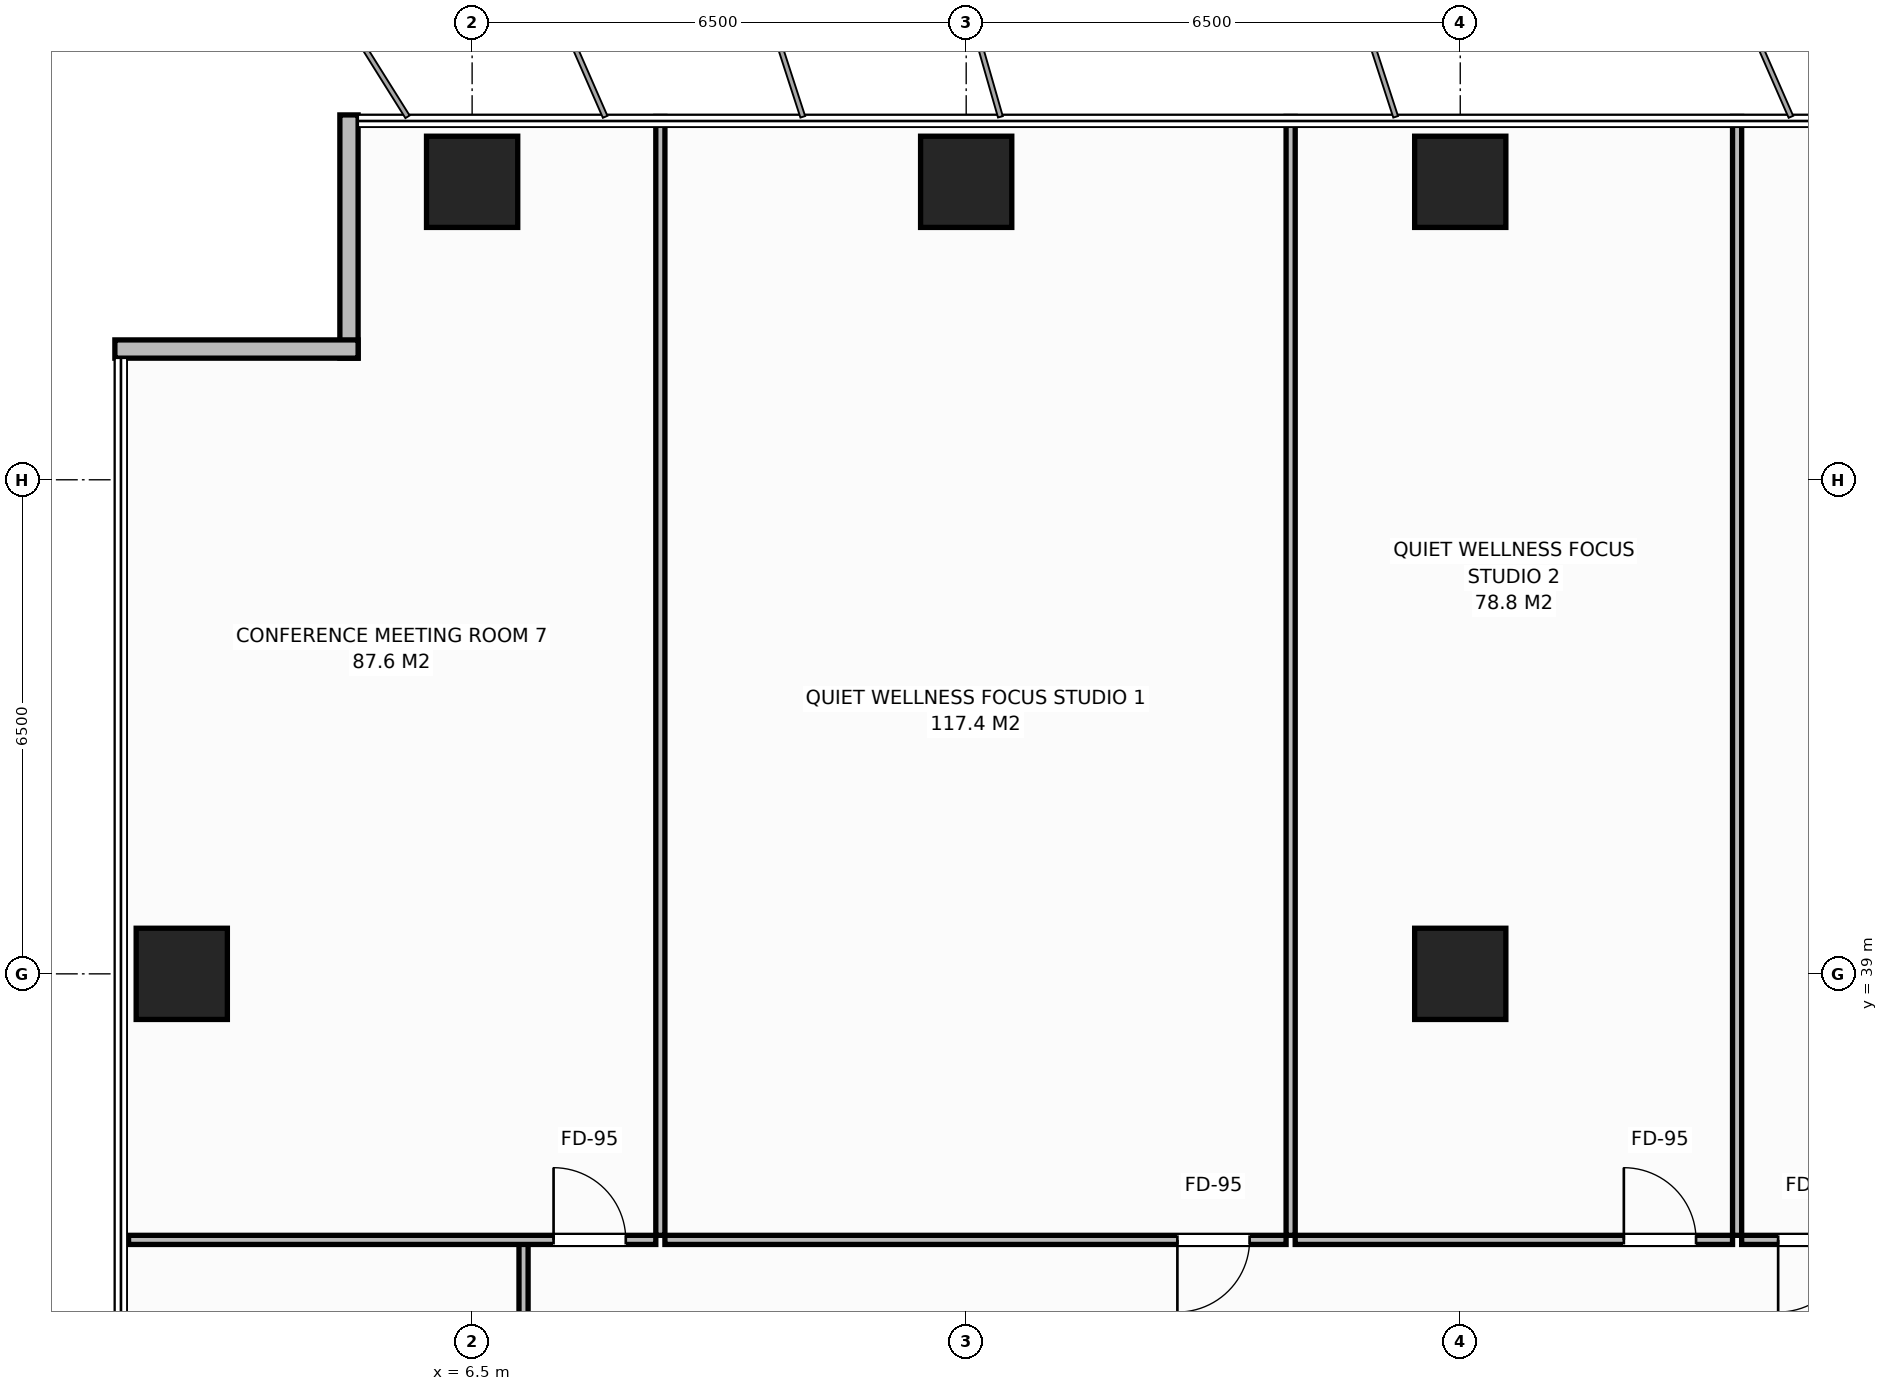
"""IFC4 building model, lengths in metres.
Left out: names, types, materials, properties, quantities, classifications, styles, units other than length and angle.
Written with IfcOpenShell. Run it as: python <this file> out.ifc"""

import sys

from ifc_helpers import new_model, si_unit, direction, frame, frame_2d, origin, origin_2d, place, context, subcontext, project, spatial, rectangle, extrude, element, fill, save


model = new_model("IFC4")
c1 = context("Model", 3, precision=1e-05, world=origin(), true_north=direction((0.0, 1.0)))
c2 = subcontext(c1, "Body", "Model", "MODEL_VIEW")
j1 = project(units=[si_unit("LENGTHUNIT", "METRE"), si_unit("PLANEANGLEUNIT", "RADIAN")], contexts=[c1])
p1 = place(None, origin())
s1 = spatial("IfcSite", under=j1, at=p1, CompositionType="ELEMENT")
p2 = place(p1, origin())
s2 = spatial("IfcBuilding", under=s1, at=p2, CompositionType="ELEMENT")
p3 = place(p2, frame((0.0, 0.0, 131.6)))
s3 = spatial("IfcBuildingStorey", under=s2, at=p3, CompositionType="ELEMENT", Elevation=131.6)
for number, where, z_axis, x_axis in (
    (1, (19.5, 39.0, 0.0), (0.0, 0.0, 1.0), (1.0, 0.0, 0.0)),
    (2, (6.5, 49.42, 0.0), (0.0, 0.0, 1.0), (1.0, 0.0, 0.0)),
    (3, (13.0, 49.42, 0.0), (0.0, 0.0, 1.0), (1.0, 0.0, 0.0)),
    (4, (19.5, 49.42, 0.0), (0.0, 0.0, 1.0), (1.0, 0.0, 0.0)),
    (5, (2.68, 39.0, 0.0), (0.0, 0.0, 1.0), (1.0, 0.0, 0.0)),
):
    element("IfcColumn", number, at=place(p3, frame(where, z_axis=z_axis, x_axis=x_axis)), inside=s3, PredefinedType="COLUMN", context=c2, shape_type="SweptSolid", body=[
        extrude(rectangle(XDim=1.2, YDim=1.2, at=origin_2d()), origin(), (0.0, 0.0, 1.0), 3.8),
    ])
for number, where, z_axis, x_axis in (
    (6, (4.88, 47.1, 0.0), (0.0, 0.0, 1.0), (0.0, 1.0, 0.0)),
    (7, (1.8, 47.22, 0.0), (0.0, 0.0, 1.0), (1.0, 0.0, 0.0)),
):
    element("IfcWall", number, at=place(p3, frame(where, z_axis=z_axis, x_axis=x_axis)), inside=s3, PredefinedType="STANDARD", context=c2, shape_type="SweptSolid", body=[
        extrude(rectangle(XDim=3.2, YDim=0.24, at=frame_2d((1.6, 0.0))), origin(), (0.0, 0.0, 1.0), 3.565),
    ])
p4 = place(p3, frame((7.177, 33.4, 0.0), z_axis=(0.0, 0.0, 1.0), x_axis=(0.0, 1.0, 0.0)))
e8 = element("IfcWall", 8, at=p4, inside=s3, PredefinedType="PARTITIONING", context=c2, shape_type="SweptSolid", body=[
    extrude(rectangle(XDim=2.1, YDim=0.12, at=frame_2d((1.05, 0.0))), origin(), (0.0, 0.0, 1.0), 3.565),
])
p5 = place(p3, frame((8.977, 35.56, 0.0), z_axis=(0.0, 0.0, 1.0), x_axis=(0.0, 1.0, 0.0)))
e9 = element("IfcWall", 9, at=p5, inside=s3, PredefinedType="PARTITIONING", context=c2, shape_type="SweptSolid", body=[
    extrude(rectangle(XDim=14.72, YDim=0.12, at=frame_2d((7.36, 0.0))), origin(), (0.0, 0.0, 1.0), 3.565),
])
p6 = place(p3, frame((1.98, 35.5, 0.0), z_axis=(0.0, 0.0, 1.0), x_axis=(1.0, 0.0, 0.0)))
e10 = element("IfcWall", 10, at=p6, inside=s3, PredefinedType="PARTITIONING", context=c2, shape_type="SweptSolid", body=[
    extrude(rectangle(XDim=6.937, YDim=0.12, at=frame_2d((3.468, 0.0))), origin(), (0.0, 0.0, 1.0), 3.565),
])
p7 = place(p6, frame((5.592, 0.0, 0.0)))
e11 = element("IfcOpeningElement", 11, at=p7, cuts=e10, PredefinedType="OPENING", context=c2, shape_type="SweptSolid", body=[
    extrude(rectangle(XDim=0.95, YDim=2.15, at=frame_2d((0.475, 1.075))), frame((0.0, 0.07, 0.0), z_axis=(0.0, -1.0, 0.0), x_axis=(1.0, 0.0, 0.0)), (0.0, 0.0, 1.0), 0.14),
])
p8 = place(p3, frame((17.269, 35.56, 0.0), z_axis=(0.0, 0.0, 1.0), x_axis=(0.0, 1.0, 0.0)))
e12 = element("IfcWall", 12, at=p8, inside=s3, PredefinedType="PARTITIONING", context=c2, shape_type="SweptSolid", body=[
    extrude(rectangle(XDim=14.72, YDim=0.12, at=frame_2d((7.36, 0.0))), origin(), (0.0, 0.0, 1.0), 3.565),
])
p9 = place(p3, frame((9.037, 35.5, 0.0), z_axis=(0.0, 0.0, 1.0), x_axis=(1.0, 0.0, 0.0)))
e13 = element("IfcWall", 13, at=p9, inside=s3, PredefinedType="PARTITIONING", context=c2, shape_type="SweptSolid", body=[
    extrude(rectangle(XDim=8.172, YDim=0.12, at=frame_2d((4.086, 0.0))), origin(), (0.0, 0.0, 1.0), 3.565),
])
p10 = place(p9, frame((6.742, 0.0, 0.0)))
e14 = element("IfcOpeningElement", 14, at=p10, cuts=e13, PredefinedType="OPENING", context=c2, shape_type="SweptSolid", body=[
    extrude(rectangle(XDim=0.95, YDim=2.15, at=frame_2d((0.475, 1.075))), frame((0.0, 0.07, 0.0), z_axis=(0.0, -1.0, 0.0), x_axis=(1.0, 0.0, 0.0)), (0.0, 0.0, 1.0), 0.14),
])
p11 = place(p3, frame((23.142, 35.56, 0.0), z_axis=(0.0, 0.0, 1.0), x_axis=(0.0, 1.0, 0.0)))
e15 = element("IfcWall", 15, at=p11, inside=s3, PredefinedType="PARTITIONING", context=c2, shape_type="SweptSolid", body=[
    extrude(rectangle(XDim=14.72, YDim=0.12, at=frame_2d((7.36, 0.0))), origin(), (0.0, 0.0, 1.0), 3.565),
])
p12 = place(p3, frame((17.329, 35.5, 0.0), z_axis=(0.0, 0.0, 1.0), x_axis=(1.0, 0.0, 0.0)))
e16 = element("IfcWall", 16, at=p12, inside=s3, PredefinedType="PARTITIONING", context=c2, shape_type="SweptSolid", body=[
    extrude(rectangle(XDim=5.754, YDim=0.12, at=frame_2d((2.877, 0.0))), origin(), (0.0, 0.0, 1.0), 3.565),
])
p13 = place(p12, frame((4.323, 0.0, 0.0)))
e17 = element("IfcOpeningElement", 17, at=p13, cuts=e16, PredefinedType="OPENING", context=c2, shape_type="SweptSolid", body=[
    extrude(rectangle(XDim=0.95, YDim=2.15, at=frame_2d((0.475, 1.075))), frame((0.0, 0.07, 0.0), z_axis=(0.0, -1.0, 0.0), x_axis=(1.0, 0.0, 0.0)), (0.0, 0.0, 1.0), 0.14),
])
p14 = place(p3, frame((23.202, 35.5, 0.0), z_axis=(0.0, 0.0, 1.0), x_axis=(1.0, 0.0, 0.0)))
e18 = element("IfcWall", 18, at=p14, inside=s3, PredefinedType="PARTITIONING", context=c2, shape_type="SweptSolid", body=[
    extrude(rectangle(XDim=8.172, YDim=0.12, at=frame_2d((4.086, 0.0))), origin(), (0.0, 0.0, 1.0), 3.565),
])
p15 = place(p14, frame((0.48, 0.0, 0.0)))
e19 = element("IfcOpeningElement", 19, at=p15, cuts=e18, PredefinedType="OPENING", context=c2, shape_type="SweptSolid", body=[
    extrude(rectangle(XDim=0.95, YDim=2.15, at=frame_2d((0.475, 1.075))), frame((0.0, 0.07, 0.0), z_axis=(0.0, -1.0, 0.0), x_axis=(1.0, 0.0, 0.0)), (0.0, 0.0, 1.0), 0.14),
])
p16 = place(p7, origin())
e20 = element("IfcDoor", 20, at=p16, inside=s3, OperationType="SINGLE_SWING_LEFT", PredefinedType="DOOR", context=c2, shape_type="SweptSolid", body=[
    extrude(rectangle(XDim=0.95, YDim=2.15, at=frame_2d((0.475, 1.075))), frame((0.0, 0.025, 0.0), z_axis=(0.0, -1.0, 0.0), x_axis=(1.0, 0.0, 0.0)), (0.0, 0.0, 1.0), 0.05),
])
fill(e11, e20)
p17 = place(p10, origin())
e21 = element("IfcDoor", 21, at=p17, inside=s3, OperationType="SINGLE_SWING_RIGHT", PredefinedType="DOOR", context=c2, shape_type="SweptSolid", body=[
    extrude(rectangle(XDim=0.95, YDim=2.15, at=frame_2d((0.475, 1.075))), frame((0.0, 0.025, 0.0), z_axis=(0.0, -1.0, 0.0), x_axis=(1.0, 0.0, 0.0)), (0.0, 0.0, 1.0), 0.05),
])
fill(e14, e21)
p18 = place(p13, origin())
e22 = element("IfcDoor", 22, at=p18, inside=s3, OperationType="SINGLE_SWING_LEFT", PredefinedType="DOOR", context=c2, shape_type="SweptSolid", body=[
    extrude(rectangle(XDim=0.95, YDim=2.15, at=frame_2d((0.475, 1.075))), frame((0.0, 0.025, 0.0), z_axis=(0.0, -1.0, 0.0), x_axis=(1.0, 0.0, 0.0)), (0.0, 0.0, 1.0), 0.05),
])
fill(e17, e22)
p19 = place(p15, origin())
e23 = element("IfcDoor", 23, at=p19, inside=s3, OperationType="SINGLE_SWING_RIGHT", PredefinedType="DOOR", context=c2, shape_type="SweptSolid", body=[
    extrude(rectangle(XDim=0.95, YDim=2.15, at=frame_2d((0.475, 1.075))), frame((0.0, 0.025, 0.0), z_axis=(0.0, -1.0, 0.0), x_axis=(1.0, 0.0, 0.0)), (0.0, 0.0, 1.0), 0.05),
])
fill(e19, e23)
save(model, sys.argv[1])
